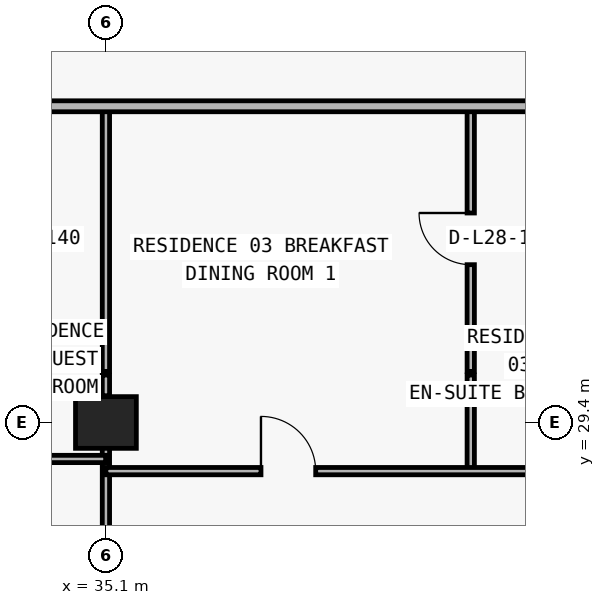
"""IFC4 building model, lengths in metres.
Left out: names, types, materials, properties, quantities, classifications, styles, units other than length and angle.
Written with IfcOpenShell. Run it as: python <this file> out.ifc"""

import sys

from ifc_helpers import new_model, si_unit, direction, frame, frame_2d, origin, origin_2d, place, context, subcontext, project, spatial, rectangle, extrude, element, fill, save


model = new_model("IFC4")
c1 = context("Model", 3, precision=1e-05, world=origin(), true_north=direction((0.0, 1.0)))
c2 = subcontext(c1, "Body", "Model", "MODEL_VIEW")
j1 = project(units=[si_unit("LENGTHUNIT", "METRE"), si_unit("PLANEANGLEUNIT", "RADIAN")], contexts=[c1])
p1 = place(None, origin())
s1 = spatial("IfcSite", under=j1, at=p1, CompositionType="ELEMENT")
p2 = place(p1, origin())
s2 = spatial("IfcBuilding", under=s1, at=p2, CompositionType="ELEMENT")
p3 = place(p2, frame((0.0, 0.0, 105.9)))
s3 = spatial("IfcBuildingStorey", under=s2, at=p3, CompositionType="ELEMENT", Elevation=105.9)
p4 = place(p3, frame((35.1, 29.4, 0.0), z_axis=(0.0, 0.0, 1.0), x_axis=(1.0, 0.0, 0.0)))
e1 = element("IfcColumn", 1, at=p4, inside=s3, PredefinedType="COLUMN", context=c2, shape_type="SweptSolid", body=[
    extrude(rectangle(XDim=1.0, YDim=0.85, at=origin_2d()), origin(), (0.0, 0.0, 1.0), 3.05),
])
p5 = place(p3, frame((35.1, 25.09, 0.0), z_axis=(0.0, 0.0, 1.0), x_axis=(0.0, 1.0, 0.0)))
e2 = element("IfcWall", 2, at=p5, inside=s3, PredefinedType="PARTITIONING", context=c2, shape_type="SweptSolid", body=[
    extrude(rectangle(XDim=4.69, YDim=0.12, at=frame_2d((2.345, 0.0))), origin(), (0.0, 0.0, 1.0), 2.174),
])
p6 = place(p5, frame((1.305, 0.0, 0.0)))
e3 = element("IfcOpeningElement", 3, at=p6, cuts=e2, PredefinedType="OPENING", context=c2, shape_type="SweptSolid", body=[
    extrude(rectangle(XDim=0.9, YDim=2.124, at=frame_2d((0.45, 1.062))), frame((0.0, 0.07, 0.0), z_axis=(0.0, -1.0, 0.0), x_axis=(1.0, 0.0, 0.0)), (0.0, 0.0, 1.0), 0.14),
])
p7 = place(p3, frame((35.1, 29.84, 0.0), z_axis=(0.0, 0.0, 1.0), x_axis=(0.0, 1.0, 0.0)))
e4 = element("IfcWall", 4, at=p7, inside=s3, PredefinedType="PARTITIONING", context=c2, shape_type="SweptSolid", body=[
    extrude(rectangle(XDim=0.34, YDim=0.12, at=frame_2d((0.17, 0.0))), origin(), (0.0, 0.0, 1.0), 2.174),
])
p8 = place(p3, frame((35.1, 30.24, 0.0), z_axis=(0.0, 0.0, 1.0), x_axis=(0.0, 1.0, 0.0)))
e5 = element("IfcWall", 5, at=p8, inside=s3, PredefinedType="PARTITIONING", context=c2, shape_type="SweptSolid", body=[
    extrude(rectangle(XDim=4.36, YDim=0.12, at=frame_2d((2.18, 0.0))), origin(), (0.0, 0.0, 1.0), 2.174),
])
p9 = place(p3, frame((41.1, 28.6, 0.0), z_axis=(0.0, 0.0, 1.0), x_axis=(0.0, 1.0, 0.0)))
e6 = element("IfcWall", 6, at=p9, inside=s3, PredefinedType="PARTITIONING", context=c2, shape_type="SweptSolid", body=[
    extrude(rectangle(XDim=1.18, YDim=0.12, at=frame_2d((0.59, 0.0))), origin(), (0.0, 0.0, 1.0), 3.05),
])
p10 = place(p3, frame((41.1, 29.84, 0.0), z_axis=(0.0, 0.0, 1.0), x_axis=(0.0, 1.0, 0.0)))
e7 = element("IfcWall", 7, at=p10, inside=s3, PredefinedType="PARTITIONING", context=c2, shape_type="SweptSolid", body=[
    extrude(rectangle(XDim=0.34, YDim=0.12, at=frame_2d((0.17, 0.0))), origin(), (0.0, 0.0, 1.0), 3.05),
])
p11 = place(p3, frame((41.1, 30.24, 0.0), z_axis=(0.0, 0.0, 1.0), x_axis=(0.0, 1.0, 0.0)))
e8 = element("IfcWall", 8, at=p11, inside=s3, PredefinedType="PARTITIONING", context=c2, shape_type="SweptSolid", body=[
    extrude(rectangle(XDim=4.36, YDim=0.12, at=frame_2d((2.18, 0.0))), origin(), (0.0, 0.0, 1.0), 3.05),
])
p12 = place(p11, frame((1.755, 0.0, 0.0)))
e9 = element("IfcOpeningElement", 9, at=p12, cuts=e8, PredefinedType="OPENING", context=c2, shape_type="SweptSolid", body=[
    extrude(rectangle(XDim=0.85, YDim=2.1, at=frame_2d((0.425, 1.05))), frame((0.0, 0.07, 0.0), z_axis=(0.0, -1.0, 0.0), x_axis=(1.0, 0.0, 0.0)), (0.0, 0.0, 1.0), 0.14),
])
p13 = place(p3, frame((35.1, 28.6, 0.0), z_axis=(0.0, 0.0, 1.0), x_axis=(1.0, 0.0, 0.0)))
e10 = element("IfcWall", 10, at=p13, inside=s3, PredefinedType="PARTITIONING", context=c2, shape_type="SweptSolid", body=[
    extrude(rectangle(XDim=7.6, YDim=0.12, at=frame_2d((3.8, 0.0))), origin(), (0.0, 0.0, 1.0), 3.05),
])
p14 = place(p13, frame((2.55, 0.0, 0.0)))
e11 = element("IfcOpeningElement", 11, at=p14, cuts=e10, PredefinedType="OPENING", context=c2, shape_type="SweptSolid", body=[
    extrude(rectangle(XDim=0.9, YDim=2.15, at=frame_2d((0.45, 1.075))), frame((0.0, 0.07, 0.0), z_axis=(0.0, -1.0, 0.0), x_axis=(1.0, 0.0, 0.0)), (0.0, 0.0, 1.0), 0.14),
])
p15 = place(p3, frame((26.92, 28.8, 0.0), z_axis=(0.0, 0.0, 1.0), x_axis=(1.0, 0.0, 0.0)))
e12 = element("IfcWall", 12, at=p15, inside=s3, PredefinedType="PARTITIONING", context=c2, shape_type="SweptSolid", body=[
    extrude(rectangle(XDim=8.175, YDim=0.12, at=frame_2d((4.087, 0.0))), origin(), (0.0, 0.0, 1.0), 3.05),
])
p16 = place(p15, frame((1.33, 0.0, 0.0)))
e13 = element("IfcOpeningElement", 13, at=p16, cuts=e12, PredefinedType="OPENING", context=c2, shape_type="SweptSolid", body=[
    extrude(rectangle(XDim=0.9, YDim=2.15, at=frame_2d((0.45, 1.075))), frame((0.0, 0.07, 0.0), z_axis=(0.0, -1.0, 0.0), x_axis=(1.0, 0.0, 0.0)), (0.0, 0.0, 1.0), 0.14),
])
p17 = place(p3, frame((26.7, 34.6, 0.0), z_axis=(0.0, 0.0, 1.0), x_axis=(1.0, 0.0, 0.0)))
e14 = element("IfcWall", 14, at=p17, inside=s3, PredefinedType="PARTITIONING", context=c2, shape_type="SweptSolid", body=[
    extrude(rectangle(XDim=32.8, YDim=0.18, at=frame_2d((16.4, 0.0))), origin(), (0.0, 0.0, 1.0), 3.05),
])
p18 = place(p17, frame((2.812, 0.0, 0.0)))
e15 = element("IfcOpeningElement", 15, at=p18, cuts=e14, PredefinedType="OPENING", context=c2, shape_type="SweptSolid", body=[
    extrude(rectangle(XDim=1.0, YDim=2.2, at=frame_2d((0.5, 1.1))), frame((0.0, 0.1, 0.0), z_axis=(0.0, -1.0, 0.0), x_axis=(1.0, 0.0, 0.0)), (0.0, 0.0, 1.0), 0.2),
])
p19 = place(p17, frame((27.104, 0.0, 0.0)))
e16 = element("IfcOpeningElement", 16, at=p19, cuts=e14, PredefinedType="OPENING", context=c2, shape_type="SweptSolid", body=[
    extrude(rectangle(XDim=1.0, YDim=2.2, at=frame_2d((0.5, 1.1))), frame((0.0, 0.1, 0.0), z_axis=(0.0, -1.0, 0.0), x_axis=(1.0, 0.0, 0.0)), (0.0, 0.0, 1.0), 0.2),
])
p20 = place(p14, origin())
e17 = element("IfcDoor", 17, at=p20, inside=s3, OperationType="SINGLE_SWING_LEFT", PredefinedType="DOOR", context=c2, shape_type="SweptSolid", body=[
    extrude(rectangle(XDim=0.9, YDim=2.15, at=frame_2d((0.45, 1.075))), frame((0.0, 0.025, 0.0), z_axis=(0.0, -1.0, 0.0), x_axis=(1.0, 0.0, 0.0)), (0.0, 0.0, 1.0), 0.05),
])
fill(e11, e17)
p21 = place(p12, origin())
e18 = element("IfcDoor", 18, at=p21, inside=s3, OperationType="SINGLE_SWING_RIGHT", PredefinedType="DOOR", context=c2, shape_type="SweptSolid", body=[
    extrude(rectangle(XDim=0.85, YDim=2.1, at=frame_2d((0.425, 1.05))), frame((0.0, 0.025, 0.0), z_axis=(0.0, -1.0, 0.0), x_axis=(1.0, 0.0, 0.0)), (0.0, 0.0, 1.0), 0.05),
])
fill(e9, e18)
save(model, sys.argv[1])
